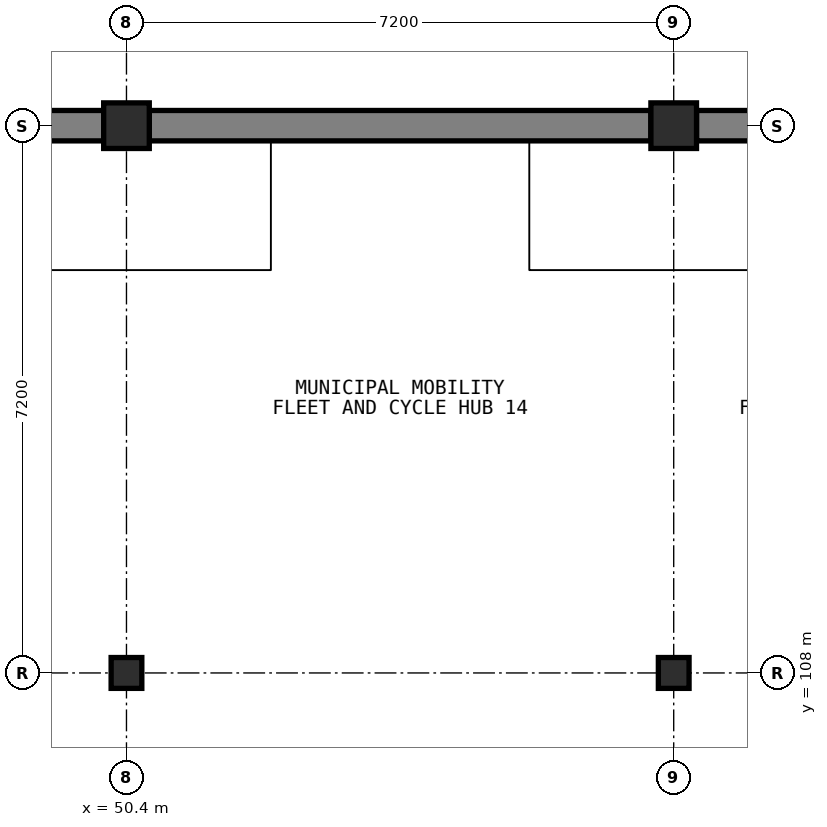
"""IFC4 building model, lengths in metres.
Left out: names, types, materials, properties, quantities, classifications, styles, units other than length and angle.
Written with IfcOpenShell. Run it as: python <this file> out.ifc"""

import sys

from ifc_helpers import new_model, si_unit, direction, frame, frame_2d, origin, origin_2d, place, context, subcontext, project, spatial, rectangle, i_section, extrude, element, save


model = new_model("IFC4")
c1 = context("Model", 3, precision=1e-05, world=origin(), true_north=direction((0.0, 1.0)))
c2 = subcontext(c1, "Body", "Model", "MODEL_VIEW")
j1 = project(units=[si_unit("LENGTHUNIT", "METRE"), si_unit("PLANEANGLEUNIT", "RADIAN")], contexts=[c1])
p1 = place(None, origin())
s1 = spatial("IfcSite", under=j1, at=p1, CompositionType="ELEMENT")
p2 = place(p1, origin())
s2 = spatial("IfcBuilding", under=s1, at=p2, CompositionType="ELEMENT")
p3 = place(p2, frame((0.0, 0.0, -4.2)))
s3 = spatial("IfcBuildingStorey", under=s2, at=p3, CompositionType="ELEMENT", Elevation=-4.2)
for number, where, z_axis, x_axis in (
    (1, (43.5, 115.2, 0.0), (0.0, 0.0, 1.0), (1.0, 0.0, 0.0)),
    (2, (50.7, 115.2, 0.0), (0.0, 0.0, 1.0), (1.0, 0.0, 0.0)),
    (3, (57.9, 115.2, 0.0), (0.0, 0.0, 1.0), (1.0, 0.0, 0.0)),
):
    element("IfcWall", number, at=place(p3, frame(where, z_axis=z_axis, x_axis=x_axis)), inside=s3, PredefinedType="USERDEFINED", context=c2, shape_type="SweptSolid", body=[
        extrude(rectangle(XDim=6.6, YDim=0.4, at=frame_2d((3.3, 0.0))), origin(), (0.0, 0.0, 1.0), 3.98),
    ])
p4 = place(p3, frame((50.4, 108.0, 0.0), z_axis=(0.0, 0.0, 1.0), x_axis=(1.0, 0.0, 0.0)))
e4 = element("IfcColumn", 4, at=p4, inside=s3, PredefinedType="COLUMN", context=c2, shape_type="SweptSolid", body=[
    extrude(i_section(OverallWidth=0.404, OverallDepth=0.406, WebThickness=0.027, FlangeThickness=0.044, FilletRadius=0.015, at=origin_2d()), origin(), (0.0, 0.0, 1.0), 4.2),
])
p5 = place(p3, frame((50.4, 115.2, 0.0), z_axis=(0.0, 0.0, 1.0), x_axis=(1.0, 0.0, 0.0)))
e5 = element("IfcColumn", 5, at=p5, inside=s3, PredefinedType="COLUMN", context=c2, shape_type="SweptSolid", body=[
    extrude(rectangle(XDim=0.6, YDim=0.6, at=origin_2d()), origin(), (0.0, 0.0, 1.0), 4.2),
])
p6 = place(p3, frame((57.6, 108.0, 0.0), z_axis=(0.0, 0.0, 1.0), x_axis=(1.0, 0.0, 0.0)))
e6 = element("IfcColumn", 6, at=p6, inside=s3, PredefinedType="COLUMN", context=c2, shape_type="SweptSolid", body=[
    extrude(i_section(OverallWidth=0.404, OverallDepth=0.406, WebThickness=0.027, FlangeThickness=0.044, FilletRadius=0.015, at=origin_2d()), origin(), (0.0, 0.0, 1.0), 4.2),
])
p7 = place(p3, frame((57.6, 115.2, 0.0), z_axis=(0.0, 0.0, 1.0), x_axis=(1.0, 0.0, 0.0)))
e7 = element("IfcColumn", 7, at=p7, inside=s3, PredefinedType="COLUMN", context=c2, shape_type="SweptSolid", body=[
    extrude(rectangle(XDim=0.6, YDim=0.6, at=origin_2d()), origin(), (0.0, 0.0, 1.0), 4.2),
])
save(model, sys.argv[1])
